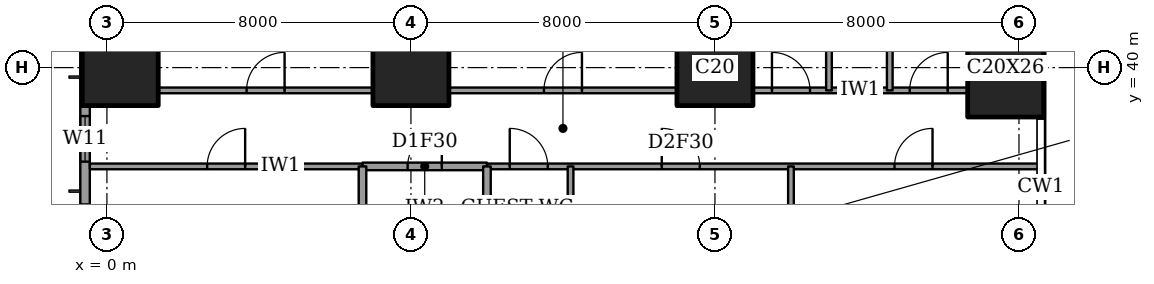
"""IFC4 building model, lengths in metres.
Left out: names, types, materials, properties, quantities, classifications, styles, units other than length and angle.
Written with IfcOpenShell. Run it as: python <this file> out.ifc"""

import sys

from ifc_helpers import new_model, si_unit, direction, frame, frame_2d, origin, origin_2d, place, context, subcontext, project, spatial, rectangle, extrude, element, fill, save


model = new_model("IFC4")
c1 = context("Model", 3, precision=1e-05, world=origin(), true_north=direction((0.0, 1.0)))
c2 = subcontext(c1, "Body", "Model", "MODEL_VIEW")
j1 = project(units=[si_unit("LENGTHUNIT", "METRE"), si_unit("PLANEANGLEUNIT", "RADIAN")], contexts=[c1])
p1 = place(None, origin())
s1 = spatial("IfcSite", under=j1, at=p1, CompositionType="ELEMENT")
p2 = place(p1, origin())
s2 = spatial("IfcBuilding", under=s1, at=p2, CompositionType="ELEMENT")
p3 = place(p2, frame((0.0, 0.0, 139.4)))
s3 = spatial("IfcBuildingStorey", under=s2, at=p3, CompositionType="ELEMENT", Elevation=139.4)
for number, where, z_axis, x_axis in (
    (1, (0.35, 40.0, 0.0), (0.0, 0.0, 1.0), (1.0, 0.0, 0.0)),
    (2, (8.0, 40.0, 0.0), (0.0, 0.0, 1.0), (1.0, 0.0, 0.0)),
    (3, (16.0, 40.0, 0.0), (0.0, 0.0, 1.0), (1.0, 0.0, 0.0)),
):
    element("IfcColumn", number, at=place(p3, frame(where, z_axis=z_axis, x_axis=x_axis)), inside=s3, PredefinedType="COLUMN", context=c2, shape_type="SweptSolid", body=[
        extrude(rectangle(XDim=2.0, YDim=2.0, at=origin_2d()), origin(), (0.0, 0.0, 1.0), 3.6),
    ])
p4 = place(p3, frame((23.65, 40.0, 0.0), z_axis=(0.0, 0.0, 1.0), x_axis=(1.0, 0.0, 0.0)))
e4 = element("IfcColumn", 4, at=p4, inside=s3, PredefinedType="COLUMN", context=c2, shape_type="SweptSolid", body=[
    extrude(rectangle(XDim=2.0, YDim=2.6, at=origin_2d()), origin(), (0.0, 0.0, 1.0), 3.6),
])
p5 = place(p3, frame((-0.575, 44.825, 0.0), z_axis=(0.0, 0.0, 1.0), x_axis=(0.0, -1.0, 0.0)))
e5 = element("IfcWall", 5, at=p5, inside=s3, PredefinedType="SOLIDWALL", context=c2, shape_type="SweptSolid", body=[
    extrude(rectangle(XDim=41.65, YDim=0.25, at=frame_2d((20.825, 0.0))), origin(), (0.0, 0.0, 1.0), 3.6),
])
p6 = place(p5, frame((0.775, 0.0, 0.4)))
e6 = element("IfcOpeningElement", 6, at=p6, cuts=e5, PredefinedType="OPENING", context=c2, shape_type="SweptSolid", body=[
    extrude(rectangle(XDim=2.4, YDim=2.2, at=frame_2d((1.2, 1.1))), frame((0.0, 0.135, 0.0), z_axis=(0.0, -1.0, 0.0), x_axis=(1.0, 0.0, 0.0)), (0.0, 0.0, 1.0), 0.27),
])
p7 = place(p5, frame((6.1, 0.0, 0.4)))
e7 = element("IfcOpeningElement", 7, at=p7, cuts=e5, PredefinedType="OPENING", context=c2, shape_type="SweptSolid", body=[
    extrude(rectangle(XDim=1.2, YDim=2.2, at=frame_2d((0.6, 1.1))), frame((0.0, 0.135, 0.0), z_axis=(0.0, -1.0, 0.0), x_axis=(1.0, 0.0, 0.0)), (0.0, 0.0, 1.0), 0.27),
])
p8 = place(p5, frame((8.425, 0.0, 0.4)))
e8 = element("IfcOpeningElement", 8, at=p8, cuts=e5, PredefinedType="OPENING", context=c2, shape_type="SweptSolid", body=[
    extrude(rectangle(XDim=2.4, YDim=2.2, at=frame_2d((1.2, 1.1))), frame((0.0, 0.135, 0.0), z_axis=(0.0, -1.0, 0.0), x_axis=(1.0, 0.0, 0.0)), (0.0, 0.0, 1.0), 0.27),
])
p9 = place(p5, frame((15.625, 0.0, 0.4)))
e9 = element("IfcOpeningElement", 9, at=p9, cuts=e5, PredefinedType="OPENING", context=c2, shape_type="SweptSolid", body=[
    extrude(rectangle(XDim=2.4, YDim=2.2, at=frame_2d((1.2, 1.1))), frame((0.0, 0.135, 0.0), z_axis=(0.0, -1.0, 0.0), x_axis=(1.0, 0.0, 0.0)), (0.0, 0.0, 1.0), 0.27),
])
p10 = place(p5, frame((23.625, 0.0, 0.4)))
e10 = element("IfcOpeningElement", 10, at=p10, cuts=e5, PredefinedType="OPENING", context=c2, shape_type="SweptSolid", body=[
    extrude(rectangle(XDim=2.4, YDim=2.2, at=frame_2d((1.2, 1.1))), frame((0.0, 0.135, 0.0), z_axis=(0.0, -1.0, 0.0), x_axis=(1.0, 0.0, 0.0)), (0.0, 0.0, 1.0), 0.27),
])
p11 = place(p5, frame((30.825, 0.0, 0.4)))
e11 = element("IfcOpeningElement", 11, at=p11, cuts=e5, PredefinedType="OPENING", context=c2, shape_type="SweptSolid", body=[
    extrude(rectangle(XDim=2.4, YDim=2.2, at=frame_2d((1.2, 1.1))), frame((0.0, 0.135, 0.0), z_axis=(0.0, -1.0, 0.0), x_axis=(1.0, 0.0, 0.0)), (0.0, 0.0, 1.0), 0.27),
])
p12 = place(p5, frame((34.5, 0.0, 0.4)))
e12 = element("IfcOpeningElement", 12, at=p12, cuts=e5, PredefinedType="OPENING", context=c2, shape_type="SweptSolid", body=[
    extrude(rectangle(XDim=1.2, YDim=2.2, at=frame_2d((0.6, 1.1))), frame((0.0, 0.135, 0.0), z_axis=(0.0, -1.0, 0.0), x_axis=(1.0, 0.0, 0.0)), (0.0, 0.0, 1.0), 0.27),
])
p13 = place(p5, frame((38.475, 0.0, 0.4)))
e13 = element("IfcOpeningElement", 13, at=p13, cuts=e5, PredefinedType="OPENING", context=c2, shape_type="SweptSolid", body=[
    extrude(rectangle(XDim=2.4, YDim=2.2, at=frame_2d((1.2, 1.1))), frame((0.0, 0.135, 0.0), z_axis=(0.0, -1.0, 0.0), x_axis=(1.0, 0.0, 0.0)), (0.0, 0.0, 1.0), 0.27),
])
p14 = place(p3, frame((6.725, 37.4, 0.0), z_axis=(0.0, 0.0, 1.0), x_axis=(1.0, 0.0, 0.0)))
e14 = element("IfcWall", 14, at=p14, inside=s3, PredefinedType="PARTITIONING", context=c2, shape_type="SweptSolid", body=[
    extrude(rectangle(XDim=3.275, YDim=0.2, at=frame_2d((1.637, 0.0))), origin(), (0.0, 0.0, 1.0), 3.35),
])
p15 = place(p14, frame((1.188, 0.0, 0.0)))
e15 = element("IfcOpeningElement", 15, at=p15, cuts=e14, PredefinedType="OPENING", context=c2, shape_type="SweptSolid", body=[
    extrude(rectangle(XDim=0.9, YDim=2.1, at=frame_2d((0.45, 1.05))), frame((0.0, 0.11, 0.0), z_axis=(0.0, -1.0, 0.0), x_axis=(1.0, 0.0, 0.0)), (0.0, 0.0, 1.0), 0.22),
])
p16 = place(p3, frame((-0.45, 37.4, 0.0), z_axis=(0.0, 0.0, 1.0), x_axis=(1.0, 0.0, 0.0)))
e16 = element("IfcWall", 16, at=p16, inside=s3, PredefinedType="PARTITIONING", context=c2, shape_type="SweptSolid", body=[
    extrude(rectangle(XDim=7.175, YDim=0.15, at=frame_2d((3.587, 0.0))), origin(), (0.0, 0.0, 1.0), 3.35),
])
p17 = place(p16, frame((3.087, 0.0, 0.0)))
e17 = element("IfcOpeningElement", 17, at=p17, cuts=e16, PredefinedType="OPENING", context=c2, shape_type="SweptSolid", body=[
    extrude(rectangle(XDim=1.0, YDim=2.1, at=frame_2d((0.5, 1.05))), frame((0.0, 0.085, 0.0), z_axis=(0.0, -1.0, 0.0), x_axis=(1.0, 0.0, 0.0)), (0.0, 0.0, 1.0), 0.17),
])
p18 = place(p3, frame((10.0, 37.4, 0.0), z_axis=(0.0, 0.0, 1.0), x_axis=(1.0, 0.0, 0.0)))
e18 = element("IfcWall", 18, at=p18, inside=s3, PredefinedType="PARTITIONING", context=c2, shape_type="SweptSolid", body=[
    extrude(rectangle(XDim=14.561, YDim=0.15, at=frame_2d((7.281, 0.0))), origin(), (0.0, 0.0, 1.0), 3.35),
])
p19 = place(p18, frame((0.6, 0.0, 0.0)))
e19 = element("IfcOpeningElement", 19, at=p19, cuts=e18, PredefinedType="OPENING", context=c2, shape_type="SweptSolid", body=[
    extrude(rectangle(XDim=1.0, YDim=2.1, at=frame_2d((0.5, 1.05))), frame((0.0, 0.085, 0.0), z_axis=(0.0, -1.0, 0.0), x_axis=(1.0, 0.0, 0.0)), (0.0, 0.0, 1.0), 0.17),
])
p20 = place(p18, frame((4.6, 0.0, 0.0)))
e20 = element("IfcOpeningElement", 20, at=p20, cuts=e18, PredefinedType="OPENING", context=c2, shape_type="SweptSolid", body=[
    extrude(rectangle(XDim=1.0, YDim=2.1, at=frame_2d((0.5, 1.05))), frame((0.0, 0.085, 0.0), z_axis=(0.0, -1.0, 0.0), x_axis=(1.0, 0.0, 0.0)), (0.0, 0.0, 1.0), 0.17),
])
p21 = place(p18, frame((10.725, 0.0, 0.0)))
e21 = element("IfcOpeningElement", 21, at=p21, cuts=e18, PredefinedType="OPENING", context=c2, shape_type="SweptSolid", body=[
    extrude(rectangle(XDim=1.0, YDim=2.1, at=frame_2d((0.5, 1.05))), frame((0.0, 0.085, 0.0), z_axis=(0.0, -1.0, 0.0), x_axis=(1.0, 0.0, 0.0)), (0.0, 0.0, 1.0), 0.17),
])
p22 = place(p3, frame((1.35, 39.4, 0.0), z_axis=(0.0, 0.0, 1.0), x_axis=(1.0, 0.0, 0.0)))
e22 = element("IfcWall", 22, at=p22, inside=s3, PredefinedType="PARTITIONING", context=c2, shape_type="SweptSolid", body=[
    extrude(rectangle(XDim=5.65, YDim=0.15, at=frame_2d((2.825, 0.0))), origin(), (0.0, 0.0, 1.0), 3.35),
])
p23 = place(p22, frame((2.325, 0.0, 0.0)))
e23 = element("IfcOpeningElement", 23, at=p23, cuts=e22, PredefinedType="OPENING", context=c2, shape_type="SweptSolid", body=[
    extrude(rectangle(XDim=1.0, YDim=2.1, at=frame_2d((0.5, 1.05))), frame((0.0, 0.085, 0.0), z_axis=(0.0, -1.0, 0.0), x_axis=(1.0, 0.0, 0.0)), (0.0, 0.0, 1.0), 0.17),
])
p24 = place(p3, frame((9.0, 39.4, 0.0), z_axis=(0.0, 0.0, 1.0), x_axis=(1.0, 0.0, 0.0)))
e24 = element("IfcWall", 24, at=p24, inside=s3, PredefinedType="PARTITIONING", context=c2, shape_type="SweptSolid", body=[
    extrude(rectangle(XDim=6.0, YDim=0.15, at=frame_2d((3.0, 0.0))), origin(), (0.0, 0.0, 1.0), 3.35),
])
p25 = place(p24, frame((2.5, 0.0, 0.0)))
e25 = element("IfcOpeningElement", 25, at=p25, cuts=e24, PredefinedType="OPENING", context=c2, shape_type="SweptSolid", body=[
    extrude(rectangle(XDim=1.0, YDim=2.1, at=frame_2d((0.5, 1.05))), frame((0.0, 0.085, 0.0), z_axis=(0.0, -1.0, 0.0), x_axis=(1.0, 0.0, 0.0)), (0.0, 0.0, 1.0), 0.17),
])
p26 = place(p3, frame((17.0, 39.4, 0.0), z_axis=(0.0, 0.0, 1.0), x_axis=(1.0, 0.0, 0.0)))
e26 = element("IfcWall", 26, at=p26, inside=s3, PredefinedType="PARTITIONING", context=c2, shape_type="SweptSolid", body=[
    extrude(rectangle(XDim=5.65, YDim=0.15, at=frame_2d((2.825, 0.0))), origin(), (0.0, 0.0, 1.0), 3.35),
])
p27 = place(p26, frame((0.5, 0.0, 0.0)))
e27 = element("IfcOpeningElement", 27, at=p27, cuts=e26, PredefinedType="OPENING", context=c2, shape_type="SweptSolid", body=[
    extrude(rectangle(XDim=1.0, YDim=2.1, at=frame_2d((0.5, 1.05))), frame((0.0, 0.085, 0.0), z_axis=(0.0, -1.0, 0.0), x_axis=(1.0, 0.0, 0.0)), (0.0, 0.0, 1.0), 0.17),
])
p28 = place(p26, frame((4.125, 0.0, 0.0)))
e28 = element("IfcOpeningElement", 28, at=p28, cuts=e26, PredefinedType="OPENING", context=c2, shape_type="SweptSolid", body=[
    extrude(rectangle(XDim=1.0, YDim=2.1, at=frame_2d((0.5, 1.05))), frame((0.0, 0.085, 0.0), z_axis=(0.0, -1.0, 0.0), x_axis=(1.0, 0.0, 0.0)), (0.0, 0.0, 1.0), 0.17),
])
p29 = place(p3, frame((6.725, 33.2, 0.0), z_axis=(0.0, 0.0, 1.0), x_axis=(0.0, 1.0, 0.0)))
e29 = element("IfcWall", 29, at=p29, inside=s3, PredefinedType="PARTITIONING", context=c2, shape_type="SweptSolid", body=[
    extrude(rectangle(XDim=4.2, YDim=0.2, at=frame_2d((2.1, 0.0))), origin(), (0.0, 0.0, 1.0), 3.35),
])
p30 = place(p3, frame((10.0, 31.0, 0.0), z_axis=(0.0, 0.0, 1.0), x_axis=(0.0, 1.0, 0.0)))
e30 = element("IfcWall", 30, at=p30, inside=s3, PredefinedType="PARTITIONING", context=c2, shape_type="SweptSolid", body=[
    extrude(rectangle(XDim=6.4, YDim=0.2, at=frame_2d((3.2, 0.0))), origin(), (0.0, 0.0, 1.0), 3.35),
])
p31 = place(p3, frame((12.2, 30.675, 0.0), z_axis=(0.0, 0.0, 1.0), x_axis=(0.0, 1.0, 0.0)))
e31 = element("IfcWall", 31, at=p31, inside=s3, PredefinedType="PARTITIONING", context=c2, shape_type="SweptSolid", body=[
    extrude(rectangle(XDim=6.725, YDim=0.15, at=frame_2d((3.362, 0.0))), origin(), (0.0, 0.0, 1.0), 3.35),
])
p32 = place(p3, frame((18.0, 28.0, 0.0), z_axis=(0.0, 0.0, 1.0), x_axis=(0.0, 1.0, 0.0)))
e32 = element("IfcWall", 32, at=p32, inside=s3, PredefinedType="PARTITIONING", context=c2, shape_type="SweptSolid", body=[
    extrude(rectangle(XDim=9.4, YDim=0.15, at=frame_2d((4.7, 0.0))), origin(), (0.0, 0.0, 1.0), 3.35),
])
p33 = place(p32, frame((0.887, 0.0, 0.0)))
e33 = element("IfcOpeningElement", 33, at=p33, cuts=e32, PredefinedType="OPENING", context=c2, shape_type="SweptSolid", body=[
    extrude(rectangle(XDim=0.9, YDim=2.1, at=frame_2d((0.45, 1.05))), frame((0.0, 0.085, 0.0), z_axis=(0.0, -1.0, 0.0), x_axis=(1.0, 0.0, 0.0)), (0.0, 0.0, 1.0), 0.17),
])
p34 = place(p3, frame((19.0, 39.4, 0.0), z_axis=(0.0, 0.0, 1.0), x_axis=(0.0, 1.0, 0.0)))
e34 = element("IfcWall", 34, at=p34, inside=s3, PredefinedType="PARTITIONING", context=c2, shape_type="SweptSolid", body=[
    extrude(rectangle(XDim=9.05, YDim=0.15, at=frame_2d((4.525, 0.0))), origin(), (0.0, 0.0, 1.0), 3.35),
])
p35 = place(p3, frame((20.6, 39.4, 0.0), z_axis=(0.0, 0.0, 1.0), x_axis=(0.0, 1.0, 0.0)))
e35 = element("IfcWall", 35, at=p35, inside=s3, PredefinedType="PARTITIONING", context=c2, shape_type="SweptSolid", body=[
    extrude(rectangle(XDim=9.05, YDim=0.15, at=frame_2d((4.525, 0.0))), origin(), (0.0, 0.0, 1.0), 3.35),
])
p36 = place(p35, frame((4.075, 0.0, 0.0)))
e36 = element("IfcOpeningElement", 36, at=p36, cuts=e35, PredefinedType="OPENING", context=c2, shape_type="SweptSolid", body=[
    extrude(rectangle(XDim=0.9, YDim=2.1, at=frame_2d((0.45, 1.05))), frame((0.0, 0.085, 0.0), z_axis=(0.0, -1.0, 0.0), x_axis=(1.0, 0.0, 0.0)), (0.0, 0.0, 1.0), 0.17),
])
p37 = place(p7, origin())
e37 = element("IfcWindow", 37, at=p37, inside=s3, PartitioningType="SINGLE_PANEL", PredefinedType="WINDOW", context=c2, shape_type="SweptSolid", body=[
    extrude(rectangle(XDim=1.2, YDim=2.2, at=frame_2d((0.6, 1.1))), frame((0.0, 0.03, 0.0), z_axis=(0.0, -1.0, 0.0), x_axis=(1.0, 0.0, 0.0)), (0.0, 0.0, 1.0), 0.06),
])
fill(e7, e37)
p38 = place(p23, origin())
e38 = element("IfcDoor", 38, at=p38, inside=s3, OperationType="SINGLE_SWING_LEFT", PredefinedType="DOOR", context=c2, shape_type="SweptSolid", body=[
    extrude(rectangle(XDim=1.0, YDim=2.1, at=frame_2d((0.5, 1.05))), frame((0.0, 0.025, 0.0), z_axis=(0.0, -1.0, 0.0), x_axis=(1.0, 0.0, 0.0)), (0.0, 0.0, 1.0), 0.05),
])
fill(e23, e38)
p39 = place(p25, origin())
e39 = element("IfcDoor", 39, at=p39, inside=s3, OperationType="SINGLE_SWING_LEFT", PredefinedType="DOOR", context=c2, shape_type="SweptSolid", body=[
    extrude(rectangle(XDim=1.0, YDim=2.1, at=frame_2d((0.5, 1.05))), frame((0.0, 0.025, 0.0), z_axis=(0.0, -1.0, 0.0), x_axis=(1.0, 0.0, 0.0)), (0.0, 0.0, 1.0), 0.05),
])
fill(e25, e39)
p40 = place(p27, origin())
e40 = element("IfcDoor", 40, at=p40, inside=s3, OperationType="SINGLE_SWING_RIGHT", PredefinedType="DOOR", context=c2, shape_type="SweptSolid", body=[
    extrude(rectangle(XDim=1.0, YDim=2.1, at=frame_2d((0.5, 1.05))), frame((0.0, 0.025, 0.0), z_axis=(0.0, -1.0, 0.0), x_axis=(1.0, 0.0, 0.0)), (0.0, 0.0, 1.0), 0.05),
])
fill(e27, e40)
p41 = place(p28, origin())
e41 = element("IfcDoor", 41, at=p41, inside=s3, OperationType="SINGLE_SWING_LEFT", PredefinedType="DOOR", context=c2, shape_type="SweptSolid", body=[
    extrude(rectangle(XDim=1.0, YDim=2.1, at=frame_2d((0.5, 1.05))), frame((0.0, 0.025, 0.0), z_axis=(0.0, -1.0, 0.0), x_axis=(1.0, 0.0, 0.0)), (0.0, 0.0, 1.0), 0.05),
])
fill(e28, e41)
p42 = place(p19, origin())
e42 = element("IfcDoor", 42, at=p42, inside=s3, OperationType="SINGLE_SWING_RIGHT", PredefinedType="DOOR", context=c2, shape_type="SweptSolid", body=[
    extrude(rectangle(XDim=1.0, YDim=2.1, at=frame_2d((0.5, 1.05))), frame((0.0, 0.025, 0.0), z_axis=(0.0, -1.0, 0.0), x_axis=(1.0, 0.0, 0.0)), (0.0, 0.0, 1.0), 0.05),
])
fill(e19, e42)
p43 = place(p17, origin())
e43 = element("IfcDoor", 43, at=p43, inside=s3, OperationType="SINGLE_SWING_LEFT", PredefinedType="DOOR", context=c2, shape_type="SweptSolid", body=[
    extrude(rectangle(XDim=1.0, YDim=2.1, at=frame_2d((0.5, 1.05))), frame((0.0, 0.025, 0.0), z_axis=(0.0, -1.0, 0.0), x_axis=(1.0, 0.0, 0.0)), (0.0, 0.0, 1.0), 0.05),
])
fill(e17, e43)
p44 = place(p15, origin())
e44 = element("IfcDoor", 44, at=p44, inside=s3, OperationType="SINGLE_SWING_LEFT", PredefinedType="DOOR", context=c2, shape_type="SweptSolid", body=[
    extrude(rectangle(XDim=0.9, YDim=2.1, at=frame_2d((0.45, 1.05))), frame((0.0, 0.025, 0.0), z_axis=(0.0, -1.0, 0.0), x_axis=(1.0, 0.0, 0.0)), (0.0, 0.0, 1.0), 0.05),
])
fill(e15, e44)
p45 = place(p20, origin())
e45 = element("IfcDoor", 45, at=p45, inside=s3, OperationType="SINGLE_SWING_RIGHT", PredefinedType="DOOR", context=c2, shape_type="SweptSolid", body=[
    extrude(rectangle(XDim=1.0, YDim=2.1, at=frame_2d((0.5, 1.05))), frame((0.0, 0.025, 0.0), z_axis=(0.0, -1.0, 0.0), x_axis=(1.0, 0.0, 0.0)), (0.0, 0.0, 1.0), 0.05),
])
fill(e20, e45)
p46 = place(p21, origin())
e46 = element("IfcDoor", 46, at=p46, inside=s3, OperationType="SINGLE_SWING_LEFT", PredefinedType="DOOR", context=c2, shape_type="SweptSolid", body=[
    extrude(rectangle(XDim=1.0, YDim=2.1, at=frame_2d((0.5, 1.05))), frame((0.0, 0.025, 0.0), z_axis=(0.0, -1.0, 0.0), x_axis=(1.0, 0.0, 0.0)), (0.0, 0.0, 1.0), 0.05),
])
fill(e21, e46)
save(model, sys.argv[1])
